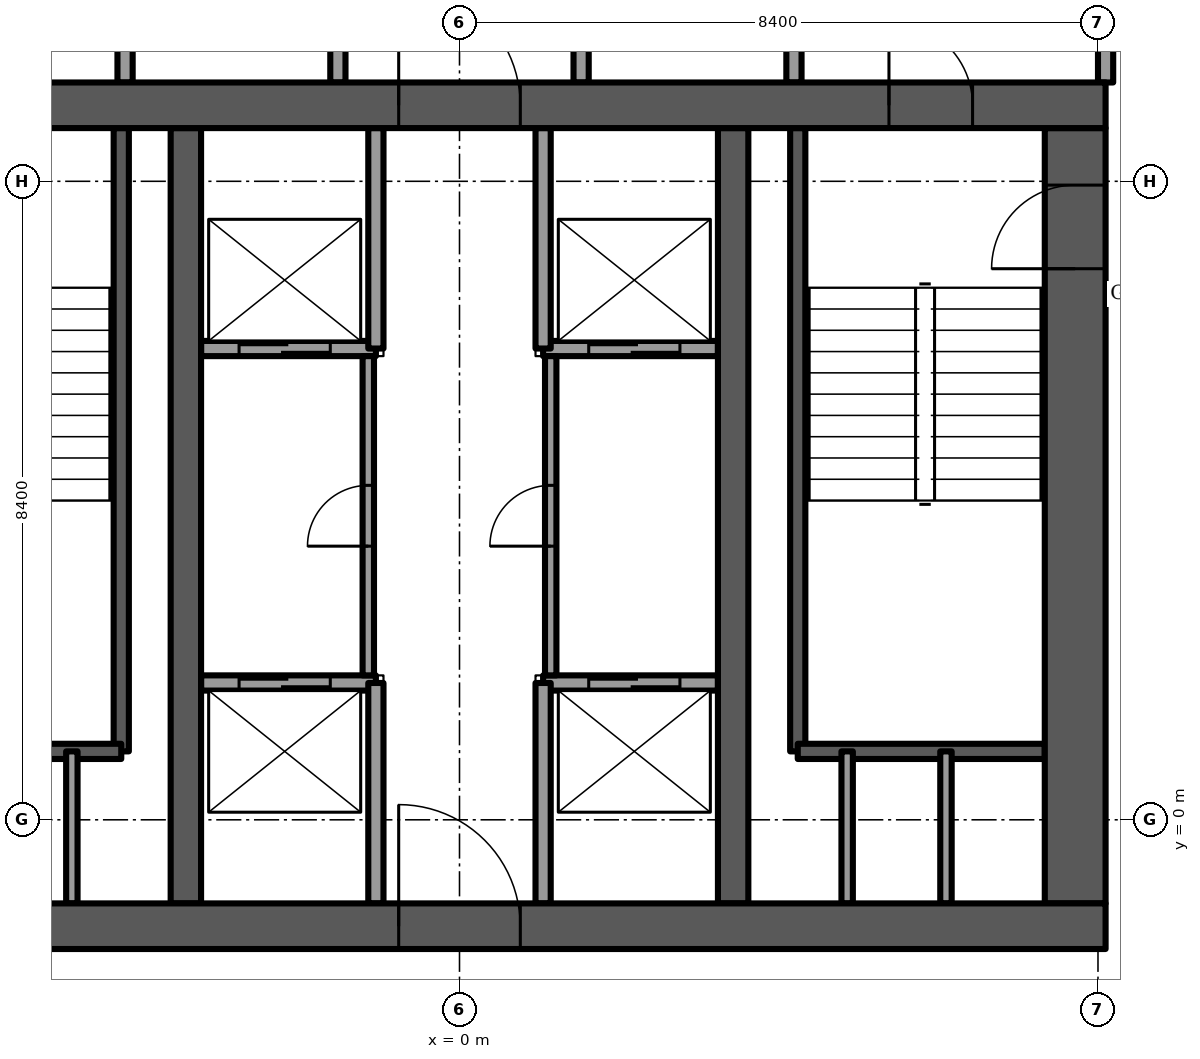
"""IFC4 building model, lengths in metres.
Left out: names, types, materials, properties, quantities, classifications, styles, units other than length and angle.
Written with IfcOpenShell. Run it as: python <this file> out.ifc"""

import sys

from ifc_helpers import new_model, si_unit, direction, frame, frame_2d, origin, place, context, subcontext, project, spatial, rectangle, extrude, element, fill, save


model = new_model("IFC4")
c1 = context("Model", 3, precision=1e-05, world=origin(), true_north=direction((0.0, 1.0)))
c2 = subcontext(c1, "Body", "Model", "MODEL_VIEW")
j1 = project(units=[si_unit("LENGTHUNIT", "METRE"), si_unit("PLANEANGLEUNIT", "RADIAN")], contexts=[c1])
p1 = place(None, origin())
s1 = spatial("IfcSite", under=j1, at=p1, CompositionType="ELEMENT")
p2 = place(p1, origin())
s2 = spatial("IfcBuilding", under=s1, at=p2, CompositionType="ELEMENT")
p3 = place(p2, frame((0.0, 0.0, 256.25)))
s3 = spatial("IfcBuildingStorey", under=s2, at=p3, CompositionType="ELEMENT", Elevation=256.25)
p4 = place(p3, frame((-8.5, -1.4, -0.3), z_axis=(0.0, 0.0, 1.0), x_axis=(1.0, 0.0, 0.0)))
e1 = element("IfcWall", 1, at=p4, inside=s3, PredefinedType="SHEAR", context=c2, shape_type="SweptSolid", body=[
    extrude(rectangle(XDim=17.0, YDim=0.6, at=frame_2d((8.5, 0.0))), origin(), (0.0, 0.0, 1.0), 3.75),
])
p5 = place(p4, frame((7.7, 0.0, 0.0)))
e2 = element("IfcOpeningElement", 2, at=p5, cuts=e1, PredefinedType="OPENING", context=c2, shape_type="SweptSolid", body=[
    extrude(rectangle(XDim=1.6, YDim=2.1, at=frame_2d((0.8, 1.05))), frame((0.0, 0.3, 0.0), z_axis=(0.0, -1.0, 0.0), x_axis=(1.0, 0.0, 0.0)), (0.0, 0.0, 1.0), 0.6),
])
p6 = place(p3, frame((-8.5, 9.4, -0.3), z_axis=(0.0, 0.0, 1.0), x_axis=(1.0, 0.0, 0.0)))
e3 = element("IfcWall", 3, at=p6, inside=s3, PredefinedType="SHEAR", context=c2, shape_type="SweptSolid", body=[
    extrude(rectangle(XDim=17.0, YDim=0.6, at=frame_2d((8.5, 0.0))), origin(), (0.0, 0.0, 1.0), 3.75),
])
p7 = place(p6, frame((7.7, 0.0, 0.0)))
e4 = element("IfcOpeningElement", 4, at=p7, cuts=e3, PredefinedType="OPENING", context=c2, shape_type="SweptSolid", body=[
    extrude(rectangle(XDim=1.6, YDim=2.1, at=frame_2d((0.8, 1.05))), frame((0.0, 0.3, 0.0), z_axis=(0.0, -1.0, 0.0), x_axis=(1.0, 0.0, 0.0)), (0.0, 0.0, 1.0), 0.6),
])
p8 = place(p6, frame((1.75, 0.0, 0.0)))
e5 = element("IfcOpeningElement", 5, at=p8, cuts=e3, PredefinedType="OPENING", context=c2, shape_type="SweptSolid", body=[
    extrude(rectangle(XDim=1.1, YDim=2.1, at=frame_2d((0.55, 1.05))), frame((0.0, 0.3, 0.0), z_axis=(0.0, -1.0, 0.0), x_axis=(1.0, 0.0, 0.0)), (0.0, 0.0, 1.0), 0.6),
])
p9 = place(p6, frame((14.15, 0.0, 0.0)))
e6 = element("IfcOpeningElement", 6, at=p9, cuts=e3, PredefinedType="OPENING", context=c2, shape_type="SweptSolid", body=[
    extrude(rectangle(XDim=1.1, YDim=2.1, at=frame_2d((0.55, 1.05))), frame((0.0, 0.3, 0.0), z_axis=(0.0, -1.0, 0.0), x_axis=(1.0, 0.0, 0.0)), (0.0, 0.0, 1.0), 0.6),
])
p10 = place(p3, frame((8.1, -1.1, -0.3), z_axis=(0.0, 0.0, 1.0), x_axis=(0.0, 1.0, 0.0)))
e7 = element("IfcWall", 7, at=p10, inside=s3, PredefinedType="SHEAR", context=c2, shape_type="SweptSolid", body=[
    extrude(rectangle(XDim=10.2, YDim=0.8, at=frame_2d((5.1, 0.0))), origin(), (0.0, 0.0, 1.0), 3.75),
])
p11 = place(p10, frame((8.35, 0.0, 0.0)))
e8 = element("IfcOpeningElement", 8, at=p11, cuts=e7, PredefinedType="OPENING", context=c2, shape_type="SweptSolid", body=[
    extrude(rectangle(XDim=1.1, YDim=2.1, at=frame_2d((0.55, 1.05))), frame((0.0, 0.4, 0.0), z_axis=(0.0, -1.0, 0.0), x_axis=(1.0, 0.0, 0.0)), (0.0, 0.0, 1.0), 0.8),
])
for number, where, z_axis, x_axis in (
    (9, (-3.6, -1.1, -0.3), (0.0, 0.0, 1.0), (0.0, 1.0, 0.0)),
    (10, (3.6, -1.1, -0.3), (0.0, 0.0, 1.0), (0.0, 1.0, 0.0)),
):
    element("IfcWall", number, at=place(p3, frame(where, z_axis=z_axis, x_axis=x_axis)), inside=s3, PredefinedType="SHEAR", context=c2, shape_type="SweptSolid", body=[
        extrude(rectangle(XDim=10.2, YDim=0.4, at=frame_2d((5.1, 0.0))), origin(), (0.0, 0.0, 1.0), 3.75),
    ])
p12 = place(p3, frame((15.246, -0.378, 0.0), z_axis=(0.0, 0.0, 1.0), x_axis=(-0.500006153997, 0.866021850744, 0.0)))
e11 = element("IfcWall", 11, at=p12, inside=s3, PredefinedType="SOLIDWALL", context=c2, shape_type="SweptSolid", body=[
    extrude(rectangle(XDim=18.673, YDim=0.15, at=frame_2d((9.336, 0.0))), origin(), (0.0, 0.0, 1.0), 3.45),
])
p13 = place(p12, frame((4.051, 0.0, 0.15)))
e12 = element("IfcOpeningElement", 12, at=p13, cuts=e11, PredefinedType="OPENING", context=c2, shape_type="SweptSolid", body=[
    extrude(rectangle(XDim=0.9, YDim=2.85, at=frame_2d((0.45, 1.425))), frame((0.0, 0.075, 0.0), z_axis=(0.0, -1.0, 0.0), x_axis=(1.0, 0.0, 0.0)), (0.0, 0.0, 1.0), 0.15),
])
p14 = place(p12, frame((6.251, 0.0, 0.15)))
e13 = element("IfcOpeningElement", 13, at=p14, cuts=e11, PredefinedType="OPENING", context=c2, shape_type="SweptSolid", body=[
    extrude(rectangle(XDim=1.4, YDim=2.85, at=frame_2d((0.7, 1.425))), frame((0.0, 0.075, 0.0), z_axis=(0.0, -1.0, 0.0), x_axis=(1.0, 0.0, 0.0)), (0.0, 0.0, 1.0), 0.15),
])
p15 = place(p12, frame((8.251, 0.0, 0.15)))
e14 = element("IfcOpeningElement", 14, at=p15, cuts=e11, PredefinedType="OPENING", context=c2, shape_type="SweptSolid", body=[
    extrude(rectangle(XDim=0.9, YDim=2.85, at=frame_2d((0.45, 1.425))), frame((0.0, 0.075, 0.0), z_axis=(0.0, -1.0, 0.0), x_axis=(1.0, 0.0, 0.0)), (0.0, 0.0, 1.0), 0.15),
])
p16 = place(p12, frame((10.451, 0.0, 0.15)))
e15 = element("IfcOpeningElement", 15, at=p16, cuts=e11, PredefinedType="OPENING", context=c2, shape_type="SweptSolid", body=[
    extrude(rectangle(XDim=1.4, YDim=2.85, at=frame_2d((0.7, 1.425))), frame((0.0, 0.075, 0.0), z_axis=(0.0, -1.0, 0.0), x_axis=(1.0, 0.0, 0.0)), (0.0, 0.0, 1.0), 0.15),
])
p17 = place(p12, frame((13.712, 0.0, 0.15)))
e16 = element("IfcOpeningElement", 16, at=p17, cuts=e11, PredefinedType="OPENING", context=c2, shape_type="SweptSolid", body=[
    extrude(rectangle(XDim=1.5, YDim=2.85, at=frame_2d((0.75, 1.425))), frame((0.0, 0.075, 0.0), z_axis=(0.0, -1.0, 0.0), x_axis=(1.0, 0.0, 0.0)), (0.0, 0.0, 1.0), 0.15),
])
p18 = place(p12, frame((1.075, 0.0, 0.15)))
e17 = element("IfcOpeningElement", 17, at=p18, cuts=e11, PredefinedType="OPENING", context=c2, shape_type="SweptSolid", body=[
    extrude(rectangle(XDim=1.5, YDim=2.73, at=frame_2d((0.75, 1.365))), frame((0.0, 0.075, 0.0), z_axis=(0.0, -1.0, 0.0), x_axis=(1.0, 0.0, 0.0)), (0.0, 0.0, 1.0), 0.15),
])
p19 = place(p12, frame((16.812, 0.0, 0.15)))
e18 = element("IfcOpeningElement", 18, at=p19, cuts=e11, PredefinedType="OPENING", context=c2, shape_type="SweptSolid", body=[
    extrude(rectangle(XDim=1.5, YDim=2.73, at=frame_2d((0.75, 1.365))), frame((0.0, 0.075, 0.0), z_axis=(0.0, -1.0, 0.0), x_axis=(1.0, 0.0, 0.0)), (0.0, 0.0, 1.0), 0.15),
])
p20 = place(p3, frame((-3.4, 1.8, 0.0), z_axis=(0.0, 0.0, 1.0), x_axis=(1.0, 0.0, 0.0)))
e19 = element("IfcWall", 19, at=p20, inside=s3, PredefinedType="PARTITIONING", context=c2, shape_type="SweptSolid", body=[
    extrude(rectangle(XDim=2.3, YDim=0.2, at=frame_2d((1.15, 0.0))), origin(), (0.0, 0.0, 1.0), 3.45),
])
p21 = place(p20, frame((0.5, 0.0, 0.0)))
e20 = element("IfcOpeningElement", 20, at=p21, cuts=e19, PredefinedType="OPENING", context=c2, shape_type="SweptSolid", body=[
    extrude(rectangle(XDim=1.2, YDim=2.1, at=frame_2d((0.6, 1.05))), frame((0.0, 0.1, 0.0), z_axis=(0.0, -1.0, 0.0), x_axis=(1.0, 0.0, 0.0)), (0.0, 0.0, 1.0), 0.2),
])
p22 = place(p3, frame((-3.4, 6.2, 0.0), z_axis=(0.0, 0.0, 1.0), x_axis=(1.0, 0.0, 0.0)))
e21 = element("IfcWall", 21, at=p22, inside=s3, PredefinedType="PARTITIONING", context=c2, shape_type="SweptSolid", body=[
    extrude(rectangle(XDim=2.3, YDim=0.2, at=frame_2d((1.15, 0.0))), origin(), (0.0, 0.0, 1.0), 3.45),
])
p23 = place(p22, frame((0.5, 0.0, 0.0)))
e22 = element("IfcOpeningElement", 22, at=p23, cuts=e21, PredefinedType="OPENING", context=c2, shape_type="SweptSolid", body=[
    extrude(rectangle(XDim=1.2, YDim=2.1, at=frame_2d((0.6, 1.05))), frame((0.0, 0.1, 0.0), z_axis=(0.0, -1.0, 0.0), x_axis=(1.0, 0.0, 0.0)), (0.0, 0.0, 1.0), 0.2),
])
p24 = place(p3, frame((1.1, 1.8, 0.0), z_axis=(0.0, 0.0, 1.0), x_axis=(1.0, 0.0, 0.0)))
e23 = element("IfcWall", 23, at=p24, inside=s3, PredefinedType="PARTITIONING", context=c2, shape_type="SweptSolid", body=[
    extrude(rectangle(XDim=2.3, YDim=0.2, at=frame_2d((1.15, 0.0))), origin(), (0.0, 0.0, 1.0), 3.45),
])
p25 = place(p24, frame((0.6, 0.0, 0.0)))
e24 = element("IfcOpeningElement", 24, at=p25, cuts=e23, PredefinedType="OPENING", context=c2, shape_type="SweptSolid", body=[
    extrude(rectangle(XDim=1.2, YDim=2.1, at=frame_2d((0.6, 1.05))), frame((0.0, 0.1, 0.0), z_axis=(0.0, -1.0, 0.0), x_axis=(1.0, 0.0, 0.0)), (0.0, 0.0, 1.0), 0.2),
])
p26 = place(p3, frame((1.1, 6.2, 0.0), z_axis=(0.0, 0.0, 1.0), x_axis=(1.0, 0.0, 0.0)))
e25 = element("IfcWall", 25, at=p26, inside=s3, PredefinedType="PARTITIONING", context=c2, shape_type="SweptSolid", body=[
    extrude(rectangle(XDim=2.3, YDim=0.2, at=frame_2d((1.15, 0.0))), origin(), (0.0, 0.0, 1.0), 3.45),
])
p27 = place(p26, frame((0.6, 0.0, 0.0)))
e26 = element("IfcOpeningElement", 26, at=p27, cuts=e25, PredefinedType="OPENING", context=c2, shape_type="SweptSolid", body=[
    extrude(rectangle(XDim=1.2, YDim=2.1, at=frame_2d((0.6, 1.05))), frame((0.0, 0.1, 0.0), z_axis=(0.0, -1.0, 0.0), x_axis=(1.0, 0.0, 0.0)), (0.0, 0.0, 1.0), 0.2),
])
for number, where, z_axis, x_axis in (
    (27, (-1.1, -1.1, 0.0), (0.0, 0.0, 1.0), (0.0, 1.0, 0.0)),
    (28, (1.1, -1.1, 0.0), (0.0, 0.0, 1.0), (0.0, 1.0, 0.0)),
    (29, (-1.1, 6.2, 0.0), (0.0, 0.0, 1.0), (0.0, 1.0, 0.0)),
    (30, (1.1, 6.2, 0.0), (0.0, 0.0, 1.0), (0.0, 1.0, 0.0)),
):
    element("IfcWall", number, at=place(p3, frame(where, z_axis=z_axis, x_axis=x_axis)), inside=s3, PredefinedType="PARTITIONING", context=c2, shape_type="SweptSolid", body=[
        extrude(rectangle(XDim=2.9, YDim=0.2, at=frame_2d((1.45, 0.0))), origin(), (0.0, 0.0, 1.0), 3.45),
    ])
p28 = place(p3, frame((-4.45, 0.9, -0.3), z_axis=(0.0, 0.0, 1.0), x_axis=(0.0, 1.0, 0.0)))
e31 = element("IfcWall", 31, at=p28, inside=s3, PredefinedType="SOLIDWALL", context=c2, shape_type="SweptSolid", body=[
    extrude(rectangle(XDim=8.2, YDim=0.2, at=frame_2d((4.1, 0.0))), origin(), (0.0, 0.0, 1.0), 3.75),
])
p29 = place(p3, frame((-7.7, 0.9, -0.3), z_axis=(0.0, 0.0, 1.0), x_axis=(1.0, 0.0, 0.0)))
e32 = element("IfcWall", 32, at=p29, inside=s3, PredefinedType="SOLIDWALL", context=c2, shape_type="SweptSolid", body=[
    extrude(rectangle(XDim=3.25, YDim=0.2, at=frame_2d((1.625, 0.0))), origin(), (0.0, 0.0, 1.0), 3.75),
])
p30 = place(p3, frame((-5.1, -1.1, 0.0), z_axis=(0.0, 0.0, 1.0), x_axis=(0.0, 1.0, 0.0)))
e33 = element("IfcWall", 33, at=p30, inside=s3, PredefinedType="PARTITIONING", context=c2, shape_type="SweptSolid", body=[
    extrude(rectangle(XDim=2.0, YDim=0.15, at=frame_2d((1.0, 0.0))), origin(), (0.0, 0.0, 1.0), 3.45),
])
p31 = place(p3, frame((4.45, 0.9, -0.3), z_axis=(0.0, 0.0, 1.0), x_axis=(0.0, 1.0, 0.0)))
e34 = element("IfcWall", 34, at=p31, inside=s3, PredefinedType="SOLIDWALL", context=c2, shape_type="SweptSolid", body=[
    extrude(rectangle(XDim=8.2, YDim=0.2, at=frame_2d((4.1, 0.0))), origin(), (0.0, 0.0, 1.0), 3.75),
])
p32 = place(p3, frame((4.45, 0.9, -0.3), z_axis=(0.0, 0.0, 1.0), x_axis=(1.0, 0.0, 0.0)))
e35 = element("IfcWall", 35, at=p32, inside=s3, PredefinedType="SOLIDWALL", context=c2, shape_type="SweptSolid", body=[
    extrude(rectangle(XDim=3.25, YDim=0.2, at=frame_2d((1.625, 0.0))), origin(), (0.0, 0.0, 1.0), 3.75),
])
for number, where, z_axis, x_axis in (
    (36, (5.1, -1.1, 0.0), (0.0, 0.0, 1.0), (0.0, 1.0, 0.0)),
    (37, (6.4, -1.1, 0.0), (0.0, 0.0, 1.0), (0.0, 1.0, 0.0)),
):
    element("IfcWall", number, at=place(p3, frame(where, z_axis=z_axis, x_axis=x_axis)), inside=s3, PredefinedType="PARTITIONING", context=c2, shape_type="SweptSolid", body=[
        extrude(rectangle(XDim=2.0, YDim=0.15, at=frame_2d((1.0, 0.0))), origin(), (0.0, 0.0, 1.0), 3.45),
    ])
p33 = place(p3, frame((8.5, 9.7, 0.0), z_axis=(0.0, 0.0, 1.0), x_axis=(0.0, 1.0, 0.0)))
e38 = element("IfcWall", 38, at=p33, inside=s3, PredefinedType="PARTITIONING", context=c2, shape_type="SweptSolid", body=[
    extrude(rectangle(XDim=1.456, YDim=0.2, at=frame_2d((0.728, 0.0))), origin(), (0.0, 0.0, 1.0), 3.45),
])
p34 = place(p3, frame((-4.4, 9.7, 0.0), z_axis=(0.0, 0.0, 1.0), x_axis=(0.0, 1.0, 0.0)))
e39 = element("IfcWall", 39, at=p34, inside=s3, PredefinedType="PARTITIONING", context=c2, shape_type="SweptSolid", body=[
    extrude(rectangle(XDim=3.9, YDim=0.2, at=frame_2d((1.95, 0.0))), origin(), (0.0, 0.0, 1.0), 3.45),
])
p35 = place(p34, frame((1.35, 0.0, 0.0)))
e40 = element("IfcOpeningElement", 40, at=p35, cuts=e39, PredefinedType="OPENING", context=c2, shape_type="SweptSolid", body=[
    extrude(rectangle(XDim=1.2, YDim=2.1, at=frame_2d((0.6, 1.05))), frame((0.0, 0.1, 0.0), z_axis=(0.0, -1.0, 0.0), x_axis=(1.0, 0.0, 0.0)), (0.0, 0.0, 1.0), 0.2),
])
p36 = place(p3, frame((4.4, 9.7, 0.0), z_axis=(0.0, 0.0, 1.0), x_axis=(0.0, 1.0, 0.0)))
e41 = element("IfcWall", 41, at=p36, inside=s3, PredefinedType="PARTITIONING", context=c2, shape_type="SweptSolid", body=[
    extrude(rectangle(XDim=3.9, YDim=0.2, at=frame_2d((1.95, 0.0))), origin(), (0.0, 0.0, 1.0), 3.45),
])
p37 = place(p36, frame((1.35, 0.0, 0.0)))
e42 = element("IfcOpeningElement", 42, at=p37, cuts=e41, PredefinedType="OPENING", context=c2, shape_type="SweptSolid", body=[
    extrude(rectangle(XDim=1.2, YDim=2.1, at=frame_2d((0.6, 1.05))), frame((0.0, 0.1, 0.0), z_axis=(0.0, -1.0, 0.0), x_axis=(1.0, 0.0, 0.0)), (0.0, 0.0, 1.0), 0.2),
])
for number, where, z_axis, x_axis in (
    (43, (-1.6, 9.7, 0.0), (0.0, 0.0, 1.0), (0.0, 1.0, 0.0)),
    (44, (1.6, 9.7, 0.0), (0.0, 0.0, 1.0), (0.0, 1.0, 0.0)),
):
    element("IfcWall", number, at=place(p3, frame(where, z_axis=z_axis, x_axis=x_axis)), inside=s3, PredefinedType="PARTITIONING", context=c2, shape_type="SweptSolid", body=[
        extrude(rectangle(XDim=3.9, YDim=0.2, at=frame_2d((1.95, 0.0))), origin(), (0.0, 0.0, 1.0), 3.45),
    ])
p38 = place(p3, frame((-1.2, 1.9, 0.0), z_axis=(0.0, 0.0, 1.0), x_axis=(0.0, 1.0, 0.0)))
e45 = element("IfcWall", 45, at=p38, inside=s3, PredefinedType="PARTITIONING", context=c2, shape_type="SweptSolid", body=[
    extrude(rectangle(XDim=4.2, YDim=0.15, at=frame_2d((2.1, 0.0))), origin(), (0.0, 0.0, 1.0), 3.45),
])
p39 = place(p38, frame((1.7, 0.0, 0.0)))
e46 = element("IfcOpeningElement", 46, at=p39, cuts=e45, PredefinedType="OPENING", context=c2, shape_type="SweptSolid", body=[
    extrude(rectangle(XDim=0.8, YDim=2.1, at=frame_2d((0.4, 1.05))), frame((0.0, 0.075, 0.0), z_axis=(0.0, -1.0, 0.0), x_axis=(1.0, 0.0, 0.0)), (0.0, 0.0, 1.0), 0.15),
])
p40 = place(p3, frame((1.2, 1.9, 0.0), z_axis=(0.0, 0.0, 1.0), x_axis=(0.0, 1.0, 0.0)))
e47 = element("IfcWall", 47, at=p40, inside=s3, PredefinedType="PARTITIONING", context=c2, shape_type="SweptSolid", body=[
    extrude(rectangle(XDim=4.2, YDim=0.15, at=frame_2d((2.1, 0.0))), origin(), (0.0, 0.0, 1.0), 3.45),
])
p41 = place(p40, frame((1.7, 0.0, 0.0)))
e48 = element("IfcOpeningElement", 48, at=p41, cuts=e47, PredefinedType="OPENING", context=c2, shape_type="SweptSolid", body=[
    extrude(rectangle(XDim=0.8, YDim=2.1, at=frame_2d((0.4, 1.05))), frame((0.0, 0.075, 0.0), z_axis=(0.0, -1.0, 0.0), x_axis=(1.0, 0.0, 0.0)), (0.0, 0.0, 1.0), 0.15),
])
p42 = place(p21, origin())
e49 = element("IfcDoor", 49, at=p42, inside=s3, OperationType="SLIDING_TO_LEFT", PredefinedType="DOOR", context=c2, shape_type="SweptSolid", body=[
    extrude(rectangle(XDim=1.2, YDim=2.1, at=frame_2d((0.6, 1.05))), frame((0.0, 0.025, 0.0), z_axis=(0.0, -1.0, 0.0), x_axis=(1.0, 0.0, 0.0)), (0.0, 0.0, 1.0), 0.05),
])
fill(e20, e49)
p43 = place(p25, origin())
e50 = element("IfcDoor", 50, at=p43, inside=s3, OperationType="SLIDING_TO_LEFT", PredefinedType="DOOR", context=c2, shape_type="SweptSolid", body=[
    extrude(rectangle(XDim=1.2, YDim=2.1, at=frame_2d((0.6, 1.05))), frame((0.0, 0.025, 0.0), z_axis=(0.0, -1.0, 0.0), x_axis=(1.0, 0.0, 0.0)), (0.0, 0.0, 1.0), 0.05),
])
fill(e24, e50)
p44 = place(p23, origin())
e51 = element("IfcDoor", 51, at=p44, inside=s3, OperationType="SLIDING_TO_LEFT", PredefinedType="DOOR", context=c2, shape_type="SweptSolid", body=[
    extrude(rectangle(XDim=1.2, YDim=2.1, at=frame_2d((0.6, 1.05))), frame((0.0, 0.025, 0.0), z_axis=(0.0, -1.0, 0.0), x_axis=(1.0, 0.0, 0.0)), (0.0, 0.0, 1.0), 0.05),
])
fill(e22, e51)
p45 = place(p27, origin())
e52 = element("IfcDoor", 52, at=p45, inside=s3, OperationType="SLIDING_TO_LEFT", PredefinedType="DOOR", context=c2, shape_type="SweptSolid", body=[
    extrude(rectangle(XDim=1.2, YDim=2.1, at=frame_2d((0.6, 1.05))), frame((0.0, 0.025, 0.0), z_axis=(0.0, -1.0, 0.0), x_axis=(1.0, 0.0, 0.0)), (0.0, 0.0, 1.0), 0.05),
])
fill(e26, e52)
p46 = place(p5, origin())
e53 = element("IfcDoor", 53, at=p46, inside=s3, OperationType="DOUBLE_DOOR_SINGLE_SWING", PredefinedType="DOOR", context=c2, shape_type="SweptSolid", body=[
    extrude(rectangle(XDim=1.6, YDim=2.1, at=frame_2d((0.8, 1.05))), frame((0.0, 0.025, 0.0), z_axis=(0.0, -1.0, 0.0), x_axis=(1.0, 0.0, 0.0)), (0.0, 0.0, 1.0), 0.05),
])
fill(e2, e53)
p47 = place(p7, origin())
e54 = element("IfcDoor", 54, at=p47, inside=s3, OperationType="DOUBLE_DOOR_SINGLE_SWING", PredefinedType="DOOR", context=c2, shape_type="SweptSolid", body=[
    extrude(rectangle(XDim=1.6, YDim=2.1, at=frame_2d((0.8, 1.05))), frame((0.0, 0.025, 0.0), z_axis=(0.0, -1.0, 0.0), x_axis=(1.0, 0.0, 0.0)), (0.0, 0.0, 1.0), 0.05),
])
fill(e4, e54)
p48 = place(p9, origin())
e55 = element("IfcDoor", 55, at=p48, inside=s3, OperationType="SINGLE_SWING_RIGHT", PredefinedType="DOOR", context=c2, shape_type="SweptSolid", body=[
    extrude(rectangle(XDim=1.1, YDim=2.1, at=frame_2d((0.55, 1.05))), frame((0.0, 0.025, 0.0), z_axis=(0.0, -1.0, 0.0), x_axis=(1.0, 0.0, 0.0)), (0.0, 0.0, 1.0), 0.05),
])
fill(e6, e55)
p49 = place(p11, origin())
e56 = element("IfcDoor", 56, at=p49, inside=s3, OperationType="SINGLE_SWING_LEFT", PredefinedType="DOOR", context=c2, shape_type="SweptSolid", body=[
    extrude(rectangle(XDim=1.1, YDim=2.1, at=frame_2d((0.55, 1.05))), frame((0.0, 0.025, 0.0), z_axis=(0.0, -1.0, 0.0), x_axis=(1.0, 0.0, 0.0)), (0.0, 0.0, 1.0), 0.05),
])
fill(e8, e56)
p50 = place(p39, origin())
e57 = element("IfcDoor", 57, at=p50, inside=s3, OperationType="SINGLE_SWING_LEFT", PredefinedType="DOOR", context=c2, shape_type="SweptSolid", body=[
    extrude(rectangle(XDim=0.8, YDim=2.1, at=frame_2d((0.4, 1.05))), frame((0.0, 0.025, 0.0), z_axis=(0.0, -1.0, 0.0), x_axis=(1.0, 0.0, 0.0)), (0.0, 0.0, 1.0), 0.05),
])
fill(e46, e57)
p51 = place(p41, origin())
e58 = element("IfcDoor", 58, at=p51, inside=s3, OperationType="SINGLE_SWING_RIGHT", PredefinedType="DOOR", context=c2, shape_type="SweptSolid", body=[
    extrude(rectangle(XDim=0.8, YDim=2.1, at=frame_2d((0.4, 1.05))), frame((0.0, 0.025, 0.0), z_axis=(0.0, -1.0, 0.0), x_axis=(1.0, 0.0, 0.0)), (0.0, 0.0, 1.0), 0.05),
])
fill(e48, e58)
save(model, sys.argv[1])
